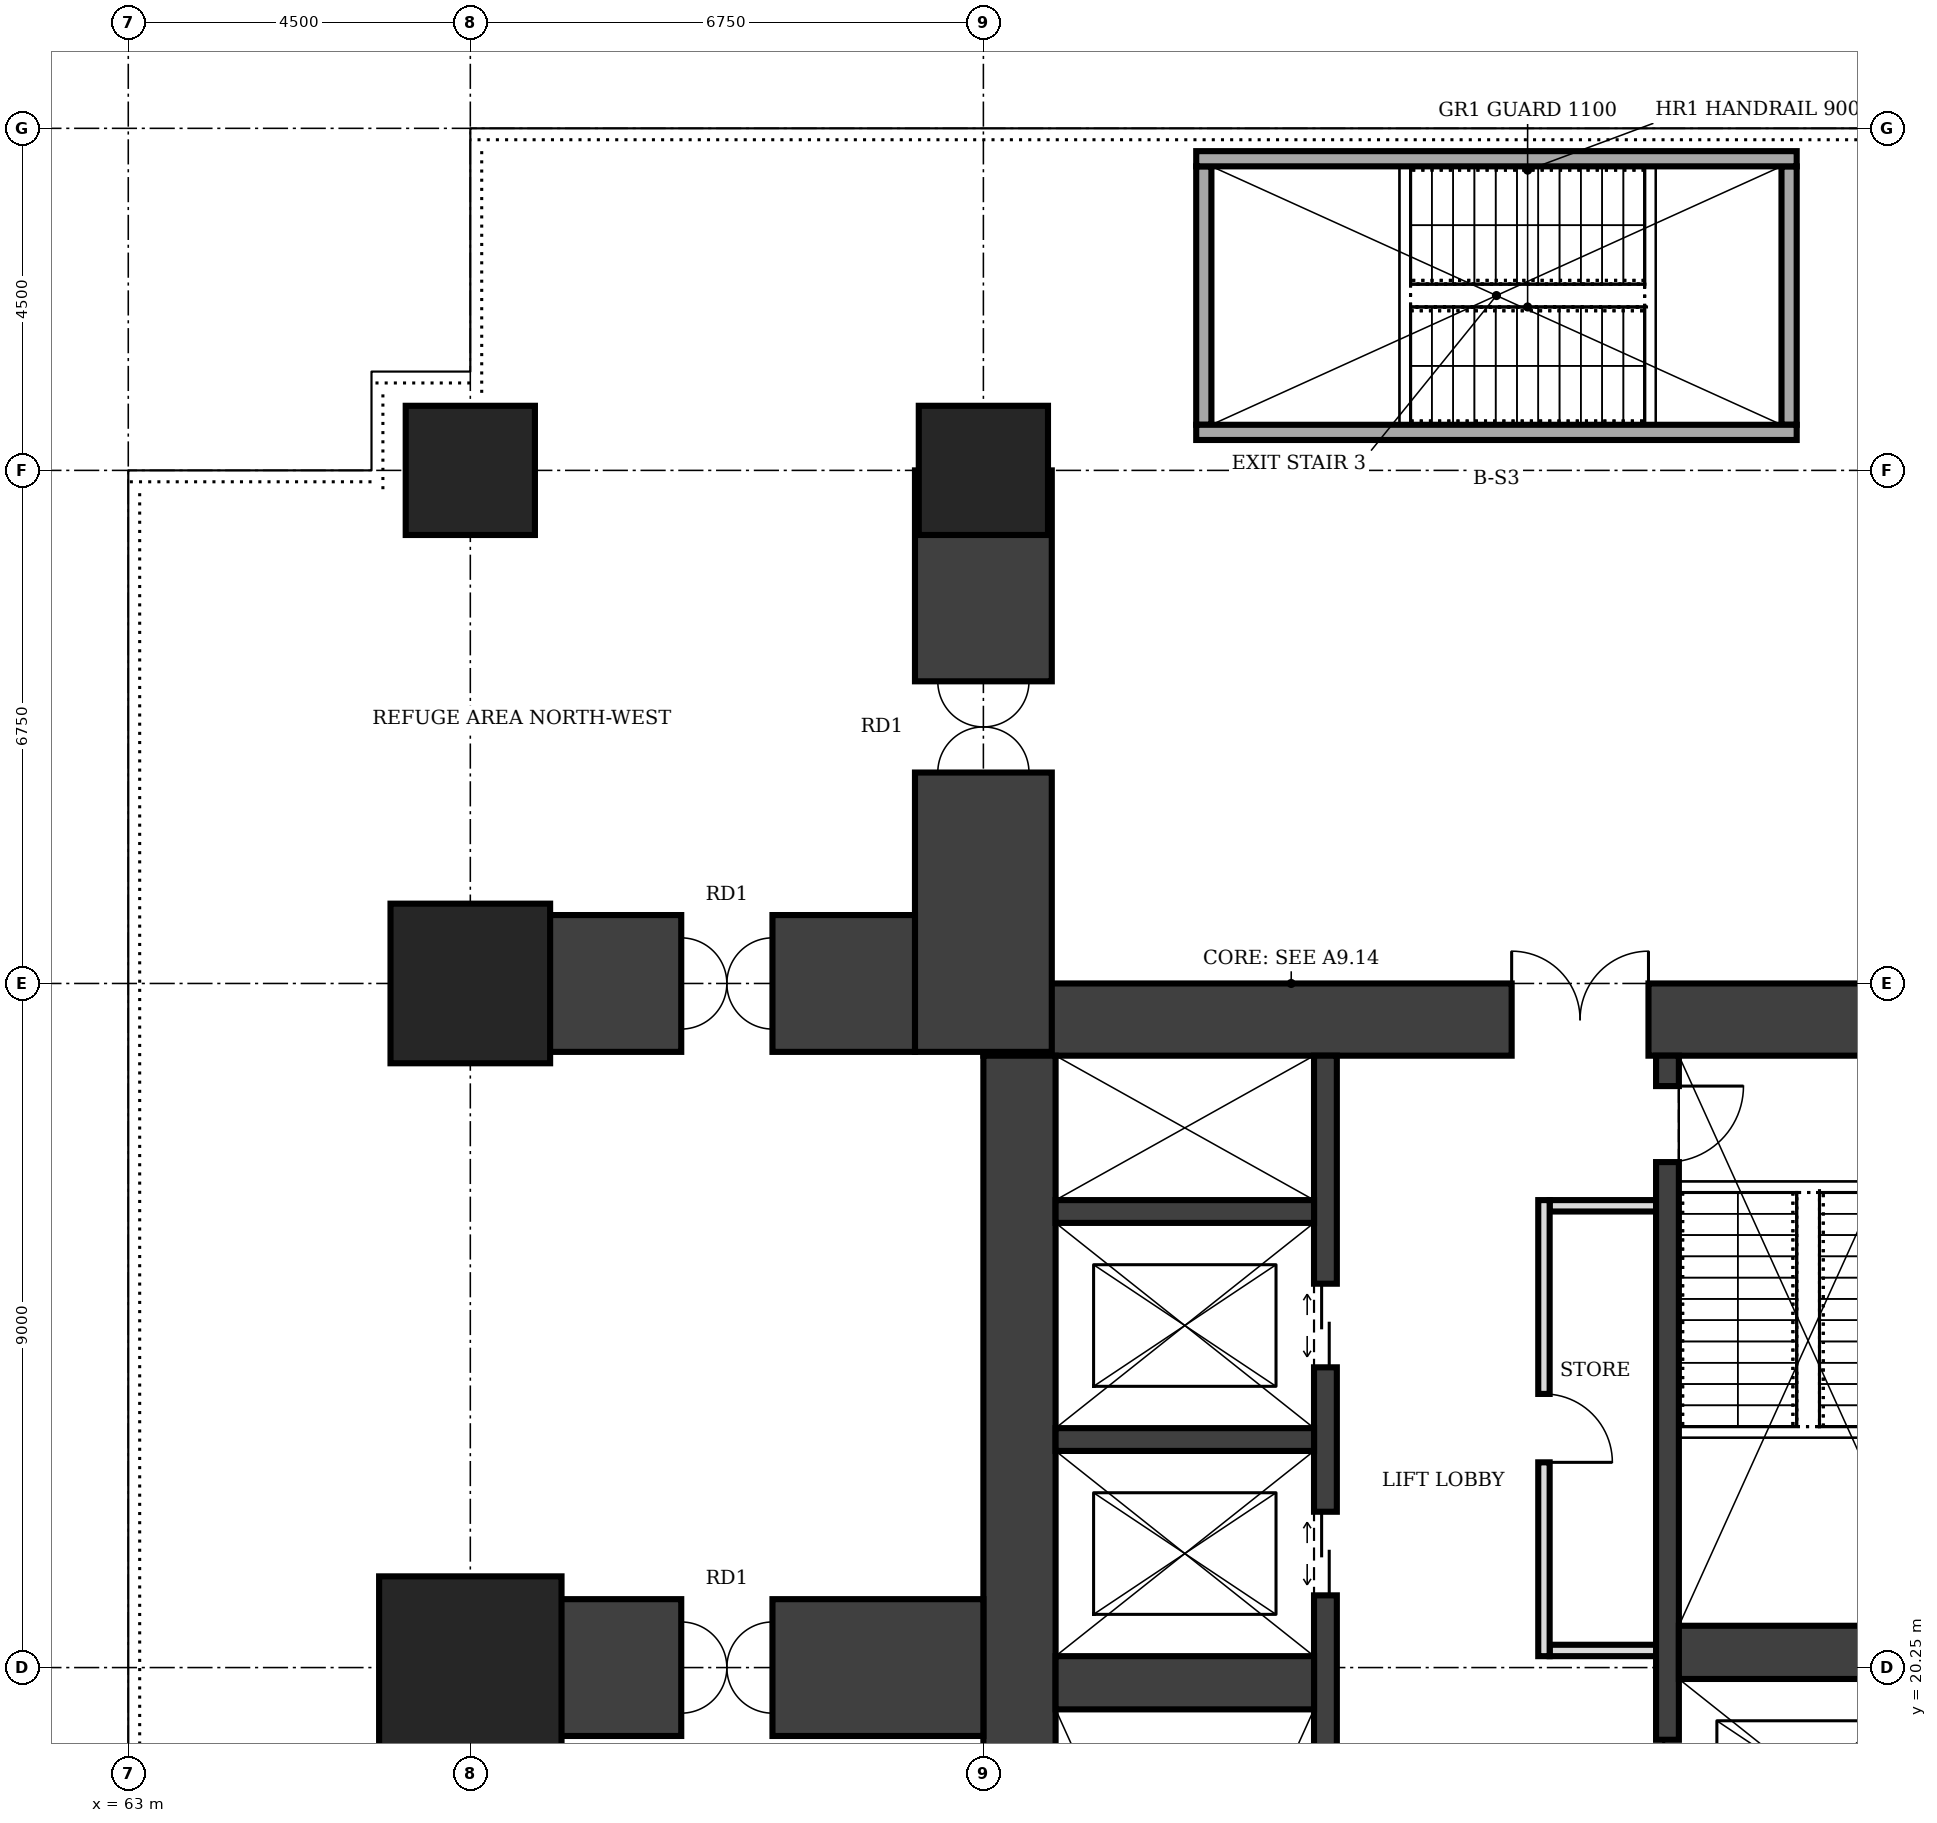
"""IFC4 building model, lengths in metres.
Left out: names, types, materials, properties, quantities, classifications, styles, units other than length and angle.
Written with IfcOpenShell. Run it as: python <this file> out.ifc"""

import sys

from ifc_helpers import new_model, si_unit, direction, frame, frame_2d, origin, origin_2d, place, context, subcontext, project, spatial, rectangle, extrude, element, fill, save


model = new_model("IFC4")
c1 = context("Model", 3, precision=1e-05, world=origin(), true_north=direction((0.0, 1.0)))
c2 = subcontext(c1, "Body", "Model", "MODEL_VIEW")
j1 = project(units=[si_unit("LENGTHUNIT", "METRE"), si_unit("PLANEANGLEUNIT", "RADIAN")], contexts=[c1])
p1 = place(None, origin())
s1 = spatial("IfcSite", under=j1, at=p1, CompositionType="ELEMENT")
p2 = place(p1, origin())
s2 = spatial("IfcBuilding", under=s1, at=p2, CompositionType="ELEMENT")
p3 = place(p2, frame((0.0, 0.0, 77.0)))
s3 = spatial("IfcBuildingStorey", under=s2, at=p3, CompositionType="ELEMENT", Elevation=77.0)
p4 = place(p3, frame((87.75, 28.775, 0.0), z_axis=(0.0, 0.0, 1.0), x_axis=(-1.0, 0.0, 0.0)))
e1 = element("IfcWall", 1, at=p4, inside=s3, PredefinedType="SHEAR", context=c2, shape_type="SweptSolid", body=[
    extrude(rectangle(XDim=13.5, YDim=0.95, at=frame_2d((6.75, 0.0))), origin(), (0.0, 0.0, 1.0), 8.0),
])
p5 = place(p4, frame((4.75, 0.0, 0.0)))
e2 = element("IfcOpeningElement", 2, at=p5, cuts=e1, PredefinedType="OPENING", context=c2, shape_type="SweptSolid", body=[
    extrude(rectangle(XDim=1.8, YDim=2.1, at=frame_2d((0.9, 1.05))), frame((0.0, 0.485, 0.0), z_axis=(0.0, -1.0, 0.0), x_axis=(1.0, 0.0, 0.0)), (0.0, 0.0, 1.0), 0.97),
])
p6 = place(p3, frame((74.725, 28.3, 0.0), z_axis=(0.0, 0.0, 1.0), x_axis=(0.0, -1.0, 0.0)))
e3 = element("IfcWall", 3, at=p6, inside=s3, PredefinedType="SHEAR", context=c2, shape_type="SweptSolid", body=[
    extrude(rectangle(XDim=16.1, YDim=0.95, at=frame_2d((8.05, 0.0))), origin(), (0.0, 0.0, 1.0), 8.0),
])
p7 = place(p3, frame((78.75, 12.2, 0.0), z_axis=(0.0, 0.0, 1.0), x_axis=(0.0, 1.0, 0.0)))
e4 = element("IfcWall", 4, at=p7, inside=s3, PredefinedType="SHEAR", context=c2, shape_type="SweptSolid", body=[
    extrude(rectangle(XDim=16.1, YDim=0.3, at=frame_2d((8.05, 0.0))), origin(), (0.0, 0.0, 1.0), 8.0),
])
p8 = place(p7, frame((0.4, 0.0, 0.0)))
e5 = element("IfcOpeningElement", 5, at=p8, cuts=e4, PredefinedType="OPENING", context=c2, shape_type="SweptSolid", body=[
    extrude(rectangle(XDim=1.0, YDim=2.1, at=frame_2d((0.5, 1.05))), frame((0.0, 0.16, 0.0), z_axis=(0.0, -1.0, 0.0), x_axis=(1.0, 0.0, 0.0)), (0.0, 0.0, 1.0), 0.32),
])
p9 = place(p7, frame((9.0, 0.0, 0.0)))
e6 = element("IfcOpeningElement", 6, at=p9, cuts=e4, PredefinedType="OPENING", context=c2, shape_type="SweptSolid", body=[
    extrude(rectangle(XDim=1.1, YDim=2.1, at=frame_2d((0.55, 1.05))), frame((0.0, 0.16, 0.0), z_axis=(0.0, -1.0, 0.0), x_axis=(1.0, 0.0, 0.0)), (0.0, 0.0, 1.0), 0.32),
])
p10 = place(p7, frame((12.0, 0.0, 0.0)))
e7 = element("IfcOpeningElement", 7, at=p10, cuts=e4, PredefinedType="OPENING", context=c2, shape_type="SweptSolid", body=[
    extrude(rectangle(XDim=1.1, YDim=2.1, at=frame_2d((0.55, 1.05))), frame((0.0, 0.16, 0.0), z_axis=(0.0, -1.0, 0.0), x_axis=(1.0, 0.0, 0.0)), (0.0, 0.0, 1.0), 0.32),
])
p11 = place(p3, frame((83.25, 12.2, 0.0), z_axis=(0.0, 0.0, 1.0), x_axis=(0.0, 1.0, 0.0)))
e8 = element("IfcWall", 8, at=p11, inside=s3, PredefinedType="SHEAR", context=c2, shape_type="SweptSolid", body=[
    extrude(rectangle(XDim=16.1, YDim=0.3, at=frame_2d((8.05, 0.0))), origin(), (0.0, 0.0, 1.0), 8.0),
])
p12 = place(p11, frame((14.7, 0.0, 0.0)))
e9 = element("IfcOpeningElement", 9, at=p12, cuts=e8, PredefinedType="OPENING", context=c2, shape_type="SweptSolid", body=[
    extrude(rectangle(XDim=1.0, YDim=2.1, at=frame_2d((0.5, 1.05))), frame((0.0, 0.16, 0.0), z_axis=(0.0, -1.0, 0.0), x_axis=(1.0, 0.0, 0.0)), (0.0, 0.0, 1.0), 0.32),
])
p13 = place(p11, frame((0.4, 0.0, 0.0)))
e10 = element("IfcOpeningElement", 10, at=p13, cuts=e8, PredefinedType="OPENING", context=c2, shape_type="SweptSolid", body=[
    extrude(rectangle(XDim=1.1, YDim=2.1, at=frame_2d((0.55, 1.05))), frame((0.0, 0.16, 0.0), z_axis=(0.0, -1.0, 0.0), x_axis=(1.0, 0.0, 0.0)), (0.0, 0.0, 1.0), 0.32),
])
p14 = place(p11, frame((6.0, 0.0, 0.0)))
e11 = element("IfcOpeningElement", 11, at=p14, cuts=e8, PredefinedType="OPENING", context=c2, shape_type="SweptSolid", body=[
    extrude(rectangle(XDim=1.1, YDim=2.1, at=frame_2d((0.55, 1.05))), frame((0.0, 0.16, 0.0), z_axis=(0.0, -1.0, 0.0), x_axis=(1.0, 0.0, 0.0)), (0.0, 0.0, 1.0), 0.32),
])
for number, where, z_axis, x_axis in (
    (12, (75.2, 20.05, 0.0), (0.0, 0.0, 1.0), (1.0, 0.0, 0.0)),
    (13, (83.4, 20.45, 0.0), (0.0, 0.0, 1.0), (1.0, 0.0, 0.0)),
):
    element("IfcWall", number, at=place(p3, frame(where, z_axis=z_axis, x_axis=x_axis)), inside=s3, PredefinedType="SHEAR", context=c2, shape_type="SweptSolid", body=[
        extrude(rectangle(XDim=3.4, YDim=0.7, at=frame_2d((1.7, 0.0))), origin(), (0.0, 0.0, 1.0), 8.0),
    ])
for number, where, z_axis, x_axis in (
    (14, (75.2, 23.25, 0.0), (0.0, 0.0, 1.0), (1.0, 0.0, 0.0)),
    (15, (75.2, 26.25, 0.0), (0.0, 0.0, 1.0), (1.0, 0.0, 0.0)),
):
    element("IfcWall", number, at=place(p3, frame(where, z_axis=z_axis, x_axis=x_axis)), inside=s3, PredefinedType="SHEAR", context=c2, shape_type="SweptSolid", body=[
        extrude(rectangle(XDim=3.4, YDim=0.3, at=frame_2d((1.7, 0.0))), origin(), (0.0, 0.0, 1.0), 8.0),
    ])
p15 = place(p3, frame((67.5, 20.25, 0.0), z_axis=(0.0, 0.0, 1.0), x_axis=(1.0, 0.0, 0.0)))
e16 = element("IfcColumn", 16, at=p15, inside=s3, PredefinedType="COLUMN", context=c2, shape_type="SweptSolid", body=[
    extrude(rectangle(XDim=2.4, YDim=2.4, at=origin_2d()), origin(), (0.0, 0.0, 1.0), 8.0),
])
p16 = place(p3, frame((67.5, 29.25, 0.0), z_axis=(0.0, 0.0, 1.0), x_axis=(1.0, 0.0, 0.0)))
e17 = element("IfcColumn", 17, at=p16, inside=s3, PredefinedType="COLUMN", context=c2, shape_type="SweptSolid", body=[
    extrude(rectangle(XDim=2.1, YDim=2.1, at=origin_2d()), origin(), (0.0, 0.0, 1.0), 8.0),
])
for number, where, z_axis, x_axis in (
    (18, (67.5, 36.0, 0.0), (0.0, 0.0, 1.0), (1.0, 0.0, 0.0)),
    (19, (74.25, 36.0, 0.0), (0.0, 0.0, 1.0), (1.0, 0.0, 0.0)),
):
    element("IfcColumn", number, at=place(p3, frame(where, z_axis=z_axis, x_axis=x_axis)), inside=s3, PredefinedType="COLUMN", context=c2, shape_type="SweptSolid", body=[
        extrude(rectangle(XDim=1.7, YDim=1.7, at=origin_2d()), origin(), (0.0, 0.0, 1.0), 8.0),
    ])
p17 = place(p3, frame((74.25, 28.35, 0.0), z_axis=(0.0, 0.0, 1.0), x_axis=(0.0, 1.0, 0.0)))
e20 = element("IfcWall", 20, at=p17, inside=s3, PredefinedType="SHEAR", context=c2, shape_type="SweptSolid", body=[
    extrude(rectangle(XDim=7.65, YDim=1.8, at=frame_2d((3.825, 0.0))), origin(), (0.0, 0.0, 1.0), 8.0),
])
p18 = place(p17, frame((3.675, 0.0, 0.0)))
e21 = element("IfcOpeningElement", 21, at=p18, cuts=e20, PredefinedType="OPENING", context=c2, shape_type="SweptSolid", body=[
    extrude(rectangle(XDim=1.2, YDim=2.1, at=frame_2d((0.6, 1.05))), frame((0.0, 0.91, 0.0), z_axis=(0.0, -1.0, 0.0), x_axis=(1.0, 0.0, 0.0)), (0.0, 0.0, 1.0), 1.82),
])
p19 = place(p3, frame((67.5, 20.25, 0.0), z_axis=(0.0, 0.0, 1.0), x_axis=(1.0, 0.0, 0.0)))
e22 = element("IfcWall", 22, at=p19, inside=s3, PredefinedType="SHEAR", context=c2, shape_type="SweptSolid", body=[
    extrude(rectangle(XDim=6.75, YDim=1.8, at=frame_2d((3.375, 0.0))), origin(), (0.0, 0.0, 1.0), 8.0),
])
p20 = place(p19, frame((2.775, 0.0, 0.0)))
e23 = element("IfcOpeningElement", 23, at=p20, cuts=e22, PredefinedType="OPENING", context=c2, shape_type="SweptSolid", body=[
    extrude(rectangle(XDim=1.2, YDim=2.1, at=frame_2d((0.6, 1.05))), frame((0.0, 0.91, 0.0), z_axis=(0.0, -1.0, 0.0), x_axis=(1.0, 0.0, 0.0)), (0.0, 0.0, 1.0), 1.82),
])
p21 = place(p3, frame((67.5, 29.25, 0.0), z_axis=(0.0, 0.0, 1.0), x_axis=(1.0, 0.0, 0.0)))
e24 = element("IfcWall", 24, at=p21, inside=s3, PredefinedType="SHEAR", context=c2, shape_type="SweptSolid", body=[
    extrude(rectangle(XDim=5.85, YDim=1.8, at=frame_2d((2.925, 0.0))), origin(), (0.0, 0.0, 1.0), 8.0),
])
p22 = place(p21, frame((2.775, 0.0, 0.0)))
e25 = element("IfcOpeningElement", 25, at=p22, cuts=e24, PredefinedType="OPENING", context=c2, shape_type="SweptSolid", body=[
    extrude(rectangle(XDim=1.2, YDim=2.1, at=frame_2d((0.6, 1.05))), frame((0.0, 0.91, 0.0), z_axis=(0.0, -1.0, 0.0), x_axis=(1.0, 0.0, 0.0)), (0.0, 0.0, 1.0), 1.82),
])
p23 = place(p3, frame((81.625, 20.4, 0.0), z_axis=(0.0, 0.0, 1.0), x_axis=(0.0, 1.0, 0.0)))
e26 = element("IfcWall", 26, at=p23, inside=s3, PredefinedType="PARTITIONING", context=c2, shape_type="SweptSolid", body=[
    extrude(rectangle(XDim=6.0, YDim=0.15, at=frame_2d((3.0, 0.0))), origin(), (0.0, 0.0, 1.0), 7.75),
])
p24 = place(p23, frame((2.55, 0.0, 0.0)))
e27 = element("IfcOpeningElement", 27, at=p24, cuts=e26, PredefinedType="OPENING", context=c2, shape_type="SweptSolid", body=[
    extrude(rectangle(XDim=0.9, YDim=2.1, at=frame_2d((0.45, 1.05))), frame((0.0, 0.085, 0.0), z_axis=(0.0, -1.0, 0.0), x_axis=(1.0, 0.0, 0.0)), (0.0, 0.0, 1.0), 0.17),
])
for number, where, z_axis, x_axis in (
    (28, (81.7, 20.475, 0.0), (0.0, 0.0, 1.0), (1.0, 0.0, 0.0)),
    (29, (81.7, 26.325, 0.0), (0.0, 0.0, 1.0), (1.0, 0.0, 0.0)),
):
    element("IfcWall", number, at=place(p3, frame(where, z_axis=z_axis, x_axis=x_axis)), inside=s3, PredefinedType="PARTITIONING", context=c2, shape_type="SweptSolid", body=[
        extrude(rectangle(XDim=1.4, YDim=0.15, at=frame_2d((0.7, 0.0))), origin(), (0.0, 0.0, 1.0), 7.75),
    ])
for number, where, z_axis, x_axis in (
    (30, (77.05, 36.5, 0.0), (0.0, 0.0, 1.0), (1.0, 0.0, 0.0)),
    (31, (77.05, 40.1, 0.0), (0.0, 0.0, 1.0), (1.0, 0.0, 0.0)),
):
    element("IfcWall", number, at=place(p3, frame(where, z_axis=z_axis, x_axis=x_axis)), inside=s3, PredefinedType="SOLIDWALL", context=c2, shape_type="SweptSolid", body=[
        extrude(rectangle(XDim=7.9, YDim=0.2, at=frame_2d((3.95, 0.0))), origin(), (0.0, 0.0, 1.0), 7.75),
    ])
for number, where, z_axis, x_axis in (
    (32, (77.15, 36.6, 0.0), (0.0, 0.0, 1.0), (0.0, 1.0, 0.0)),
    (33, (84.85, 36.6, 0.0), (0.0, 0.0, 1.0), (0.0, 1.0, 0.0)),
):
    element("IfcWall", number, at=place(p3, frame(where, z_axis=z_axis, x_axis=x_axis)), inside=s3, PredefinedType="SOLIDWALL", context=c2, shape_type="SweptSolid", body=[
        extrude(rectangle(XDim=3.4, YDim=0.2, at=frame_2d((1.7, 0.0))), origin(), (0.0, 0.0, 1.0), 7.75),
    ])
p25 = place(p5, frame((1.8, 0.0, 0.0), z_axis=(0.0, 0.0, 1.0), x_axis=(-1.0, 0.0, 0.0)))
e34 = element("IfcDoor", 34, at=p25, inside=s3, OperationType="DOUBLE_DOOR_SINGLE_SWING", PredefinedType="DOOR", context=c2, shape_type="SweptSolid", body=[
    extrude(rectangle(XDim=1.8, YDim=2.1, at=frame_2d((0.9, 1.05))), frame((0.0, 0.025, 0.0), z_axis=(0.0, -1.0, 0.0), x_axis=(1.0, 0.0, 0.0)), (0.0, 0.0, 1.0), 0.05),
])
fill(e2, e34)
p26 = place(p12, frame((1.0, 0.0, 0.0), z_axis=(0.0, 0.0, 1.0), x_axis=(-1.0, 0.0, 0.0)))
e35 = element("IfcDoor", 35, at=p26, inside=s3, OperationType="SINGLE_SWING_LEFT", PredefinedType="DOOR", context=c2, shape_type="SweptSolid", body=[
    extrude(rectangle(XDim=1.0, YDim=2.1, at=frame_2d((0.5, 1.05))), frame((0.0, 0.025, 0.0), z_axis=(0.0, -1.0, 0.0), x_axis=(1.0, 0.0, 0.0)), (0.0, 0.0, 1.0), 0.05),
])
fill(e9, e35)
p27 = place(p9, origin())
e36 = element("IfcDoor", 36, at=p27, inside=s3, OperationType="DOUBLE_DOOR_SLIDING", PredefinedType="DOOR", context=c2, shape_type="SweptSolid", body=[
    extrude(rectangle(XDim=1.1, YDim=2.1, at=frame_2d((0.55, 1.05))), frame((0.0, 0.025, 0.0), z_axis=(0.0, -1.0, 0.0), x_axis=(1.0, 0.0, 0.0)), (0.0, 0.0, 1.0), 0.05),
])
fill(e6, e36)
p28 = place(p10, origin())
e37 = element("IfcDoor", 37, at=p28, inside=s3, OperationType="DOUBLE_DOOR_SLIDING", PredefinedType="DOOR", context=c2, shape_type="SweptSolid", body=[
    extrude(rectangle(XDim=1.1, YDim=2.1, at=frame_2d((0.55, 1.05))), frame((0.0, 0.025, 0.0), z_axis=(0.0, -1.0, 0.0), x_axis=(1.0, 0.0, 0.0)), (0.0, 0.0, 1.0), 0.05),
])
fill(e7, e37)
p29 = place(p14, origin())
e38 = element("IfcDoor", 38, at=p29, inside=s3, OperationType="DOUBLE_DOOR_SLIDING", PredefinedType="DOOR", context=c2, shape_type="SweptSolid", body=[
    extrude(rectangle(XDim=1.1, YDim=2.1, at=frame_2d((0.55, 1.05))), frame((0.0, 0.025, 0.0), z_axis=(0.0, -1.0, 0.0), x_axis=(1.0, 0.0, 0.0)), (0.0, 0.0, 1.0), 0.05),
])
fill(e11, e38)
p30 = place(p24, frame((0.9, 0.0, 0.0), z_axis=(0.0, 0.0, 1.0), x_axis=(-1.0, 0.0, 0.0)))
e39 = element("IfcDoor", 39, at=p30, inside=s3, OperationType="SINGLE_SWING_RIGHT", PredefinedType="DOOR", context=c2, shape_type="SweptSolid", body=[
    extrude(rectangle(XDim=0.9, YDim=2.1, at=frame_2d((0.45, 1.05))), frame((0.0, 0.025, 0.0), z_axis=(0.0, -1.0, 0.0), x_axis=(1.0, 0.0, 0.0)), (0.0, 0.0, 1.0), 0.05),
])
fill(e27, e39)
p31 = place(p18, origin())
e40 = element("IfcDoor", 40, at=p31, inside=s3, OperationType="DOUBLE_DOOR_DOUBLE_SWING", PredefinedType="DOOR", context=c2, shape_type="SweptSolid", body=[
    extrude(rectangle(XDim=1.2, YDim=2.1, at=frame_2d((0.6, 1.05))), frame((0.0, 0.025, 0.0), z_axis=(0.0, -1.0, 0.0), x_axis=(1.0, 0.0, 0.0)), (0.0, 0.0, 1.0), 0.05),
])
fill(e21, e40)
p32 = place(p20, origin())
e41 = element("IfcDoor", 41, at=p32, inside=s3, OperationType="DOUBLE_DOOR_DOUBLE_SWING", PredefinedType="DOOR", context=c2, shape_type="SweptSolid", body=[
    extrude(rectangle(XDim=1.2, YDim=2.1, at=frame_2d((0.6, 1.05))), frame((0.0, 0.025, 0.0), z_axis=(0.0, -1.0, 0.0), x_axis=(1.0, 0.0, 0.0)), (0.0, 0.0, 1.0), 0.05),
])
fill(e23, e41)
p33 = place(p22, origin())
e42 = element("IfcDoor", 42, at=p33, inside=s3, OperationType="DOUBLE_DOOR_DOUBLE_SWING", PredefinedType="DOOR", context=c2, shape_type="SweptSolid", body=[
    extrude(rectangle(XDim=1.2, YDim=2.1, at=frame_2d((0.6, 1.05))), frame((0.0, 0.025, 0.0), z_axis=(0.0, -1.0, 0.0), x_axis=(1.0, 0.0, 0.0)), (0.0, 0.0, 1.0), 0.05),
])
fill(e25, e42)
save(model, sys.argv[1])
